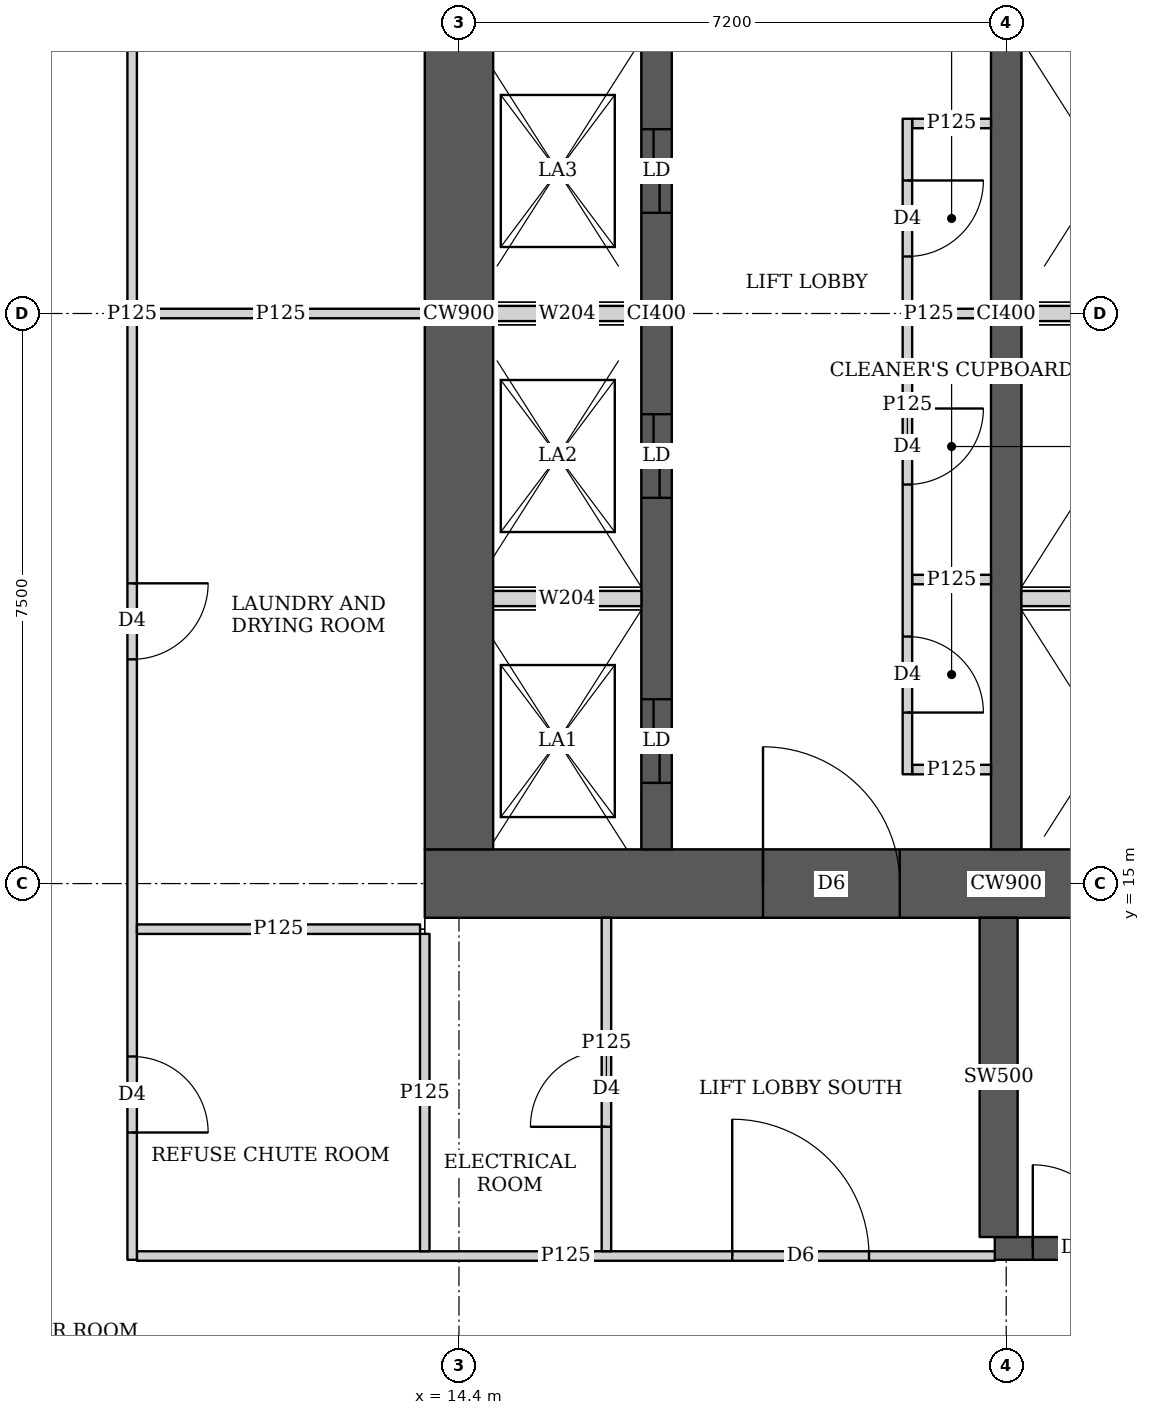
"""IFC4 building model, lengths in metres.
Left out: names, types, materials, properties, quantities, classifications, styles, units other than length and angle.
Written with IfcOpenShell. Run it as: python <this file> out.ifc"""

import sys

from ifc_helpers import new_model, si_unit, direction, frame, frame_2d, origin, place, context, subcontext, project, spatial, rectangle, extrude, element, fill, save


model = new_model("IFC4")
c1 = context("Model", 3, precision=1e-05, world=origin(), true_north=direction((0.0, 1.0)))
c2 = subcontext(c1, "Body", "Model", "MODEL_VIEW")
j1 = project(units=[si_unit("LENGTHUNIT", "METRE"), si_unit("PLANEANGLEUNIT", "RADIAN")], contexts=[c1])
p1 = place(None, origin())
s1 = spatial("IfcSite", under=j1, at=p1, CompositionType="ELEMENT")
p2 = place(p1, origin())
s2 = spatial("IfcBuilding", under=s1, at=p2, CompositionType="ELEMENT")
p3 = place(p2, frame((0.0, 0.0, 122.9)))
s3 = spatial("IfcBuildingStorey", under=s2, at=p3, CompositionType="ELEMENT", Elevation=122.9)
p4 = place(p3, frame((13.95, 15.0, 0.0), z_axis=(0.0, 0.0, 1.0), x_axis=(1.0, 0.0, 0.0)))
e1 = element("IfcWall", 1, at=p4, inside=s3, PredefinedType="SHEAR", context=c2, shape_type="SweptSolid", body=[
    extrude(rectangle(XDim=15.3, YDim=0.9, at=frame_2d((7.65, 0.0))), origin(), (0.0, 0.0, 1.0), 3.75),
])
p5 = place(p4, frame((4.45, 0.0, 0.0)))
e2 = element("IfcOpeningElement", 2, at=p5, cuts=e1, PredefinedType="OPENING", context=c2, shape_type="SweptSolid", body=[
    extrude(rectangle(XDim=1.8, YDim=2.1, at=frame_2d((0.9, 1.05))), frame((0.0, 0.46, 0.0), z_axis=(0.0, -1.0, 0.0), x_axis=(1.0, 0.0, 0.0)), (0.0, 0.0, 1.0), 0.92),
])
p6 = place(p4, frame((10.7, 0.0, 0.0)))
e3 = element("IfcOpeningElement", 3, at=p6, cuts=e1, PredefinedType="OPENING", context=c2, shape_type="SweptSolid", body=[
    extrude(rectangle(XDim=1.1, YDim=2.1, at=frame_2d((0.55, 1.05))), frame((0.0, 0.46, 0.0), z_axis=(0.0, -1.0, 0.0), x_axis=(1.0, 0.0, 0.0)), (0.0, 0.0, 1.0), 0.92),
])
p7 = place(p3, frame((14.4, 15.45, 0.0), z_axis=(0.0, 0.0, 1.0), x_axis=(0.0, 1.0, 0.0)))
e4 = element("IfcWall", 4, at=p7, inside=s3, PredefinedType="SHEAR", context=c2, shape_type="SweptSolid", body=[
    extrude(rectangle(XDim=14.1, YDim=0.9, at=frame_2d((7.05, 0.0))), origin(), (0.0, 0.0, 1.0), 3.75),
])
p8 = place(p3, frame((17.0, 15.45, 0.0), z_axis=(0.0, 0.0, 1.0), x_axis=(0.0, 1.0, 0.0)))
e5 = element("IfcWall", 5, at=p8, inside=s3, PredefinedType="SHEAR", context=c2, shape_type="SweptSolid", body=[
    extrude(rectangle(XDim=14.1, YDim=0.4, at=frame_2d((7.05, 0.0))), origin(), (0.0, 0.0, 1.0), 3.75),
])
p9 = place(p8, frame((0.875, 0.0, 0.0)))
e6 = element("IfcOpeningElement", 6, at=p9, cuts=e5, PredefinedType="OPENING", context=c2, shape_type="SweptSolid", body=[
    extrude(rectangle(XDim=1.1, YDim=2.1, at=frame_2d((0.55, 1.05))), frame((0.0, 0.21, 0.0), z_axis=(0.0, -1.0, 0.0), x_axis=(1.0, 0.0, 0.0)), (0.0, 0.0, 1.0), 0.42),
])
p10 = place(p8, frame((4.625, 0.0, 0.0)))
e7 = element("IfcOpeningElement", 7, at=p10, cuts=e5, PredefinedType="OPENING", context=c2, shape_type="SweptSolid", body=[
    extrude(rectangle(XDim=1.1, YDim=2.1, at=frame_2d((0.55, 1.05))), frame((0.0, 0.21, 0.0), z_axis=(0.0, -1.0, 0.0), x_axis=(1.0, 0.0, 0.0)), (0.0, 0.0, 1.0), 0.42),
])
p11 = place(p8, frame((8.375, 0.0, 0.0)))
e8 = element("IfcOpeningElement", 8, at=p11, cuts=e5, PredefinedType="OPENING", context=c2, shape_type="SweptSolid", body=[
    extrude(rectangle(XDim=1.1, YDim=2.1, at=frame_2d((0.55, 1.05))), frame((0.0, 0.21, 0.0), z_axis=(0.0, -1.0, 0.0), x_axis=(1.0, 0.0, 0.0)), (0.0, 0.0, 1.0), 0.42),
])
p12 = place(p8, frame((12.125, 0.0, 0.0)))
e9 = element("IfcOpeningElement", 9, at=p12, cuts=e5, PredefinedType="OPENING", context=c2, shape_type="SweptSolid", body=[
    extrude(rectangle(XDim=1.1, YDim=2.1, at=frame_2d((0.55, 1.05))), frame((0.0, 0.21, 0.0), z_axis=(0.0, -1.0, 0.0), x_axis=(1.0, 0.0, 0.0)), (0.0, 0.0, 1.0), 0.42),
])
p13 = place(p3, frame((21.6, 15.45, 0.0), z_axis=(0.0, 0.0, 1.0), x_axis=(0.0, 1.0, 0.0)))
e10 = element("IfcWall", 10, at=p13, inside=s3, PredefinedType="SHEAR", context=c2, shape_type="SweptSolid", body=[
    extrude(rectangle(XDim=14.1, YDim=0.4, at=frame_2d((7.05, 0.0))), origin(), (0.0, 0.0, 1.0), 3.75),
])
p14 = place(p3, frame((21.45, 10.2, 0.0), z_axis=(0.0, 0.0, 1.0), x_axis=(1.0, 0.0, 0.0)))
e11 = element("IfcWall", 11, at=p14, inside=s3, PredefinedType="SHEAR", context=c2, shape_type="SweptSolid", body=[
    extrude(rectangle(XDim=7.5, YDim=0.3, at=frame_2d((3.75, 0.0))), origin(), (0.0, 0.0, 1.0), 3.75),
])
p15 = place(p14, frame((0.5, 0.0, 0.0)))
e12 = element("IfcOpeningElement", 12, at=p15, cuts=e11, PredefinedType="OPENING", context=c2, shape_type="SweptSolid", body=[
    extrude(rectangle(XDim=1.1, YDim=2.1, at=frame_2d((0.55, 1.05))), frame((0.0, 0.16, 0.0), z_axis=(0.0, -1.0, 0.0), x_axis=(1.0, 0.0, 0.0)), (0.0, 0.0, 1.0), 0.32),
])
p16 = place(p3, frame((21.5, 10.35, 0.0), z_axis=(0.0, 0.0, 1.0), x_axis=(0.0, 1.0, 0.0)))
e13 = element("IfcWall", 13, at=p16, inside=s3, PredefinedType="SHEAR", context=c2, shape_type="SweptSolid", body=[
    extrude(rectangle(XDim=4.2, YDim=0.5, at=frame_2d((2.1, 0.0))), origin(), (0.0, 0.0, 1.0), 3.75),
])
p17 = place(p3, frame((10.1, 10.05, 0.0), z_axis=(0.0, 0.0, 1.0), x_axis=(0.0, 1.0, 0.0)))
e14 = element("IfcWall", 14, at=p17, inside=s3, PredefinedType="PARTITIONING", context=c2, shape_type="SweptSolid", body=[
    extrude(rectangle(XDim=24.9, YDim=0.125, at=frame_2d((12.45, 0.0))), origin(), (0.0, 0.0, 1.0), 3.5),
])
p18 = place(p17, frame((1.675, 0.0, 0.0)))
e15 = element("IfcOpeningElement", 15, at=p18, cuts=e14, PredefinedType="OPENING", context=c2, shape_type="SweptSolid", body=[
    extrude(rectangle(XDim=1.0, YDim=2.1, at=frame_2d((0.5, 1.05))), frame((0.0, 0.073, 0.0), z_axis=(0.0, -1.0, 0.0), x_axis=(1.0, 0.0, 0.0)), (0.0, 0.0, 1.0), 0.145),
])
p19 = place(p17, frame((7.9, 0.0, 0.0)))
e16 = element("IfcOpeningElement", 16, at=p19, cuts=e14, PredefinedType="OPENING", context=c2, shape_type="SweptSolid", body=[
    extrude(rectangle(XDim=1.0, YDim=2.1, at=frame_2d((0.5, 1.05))), frame((0.0, 0.073, 0.0), z_axis=(0.0, -1.0, 0.0), x_axis=(1.0, 0.0, 0.0)), (0.0, 0.0, 1.0), 0.145),
])
p20 = place(p17, frame((16.0, 0.0, 0.0)))
e17 = element("IfcOpeningElement", 17, at=p20, cuts=e14, PredefinedType="OPENING", context=c2, shape_type="SweptSolid", body=[
    extrude(rectangle(XDim=1.0, YDim=2.1, at=frame_2d((0.5, 1.05))), frame((0.0, 0.073, 0.0), z_axis=(0.0, -1.0, 0.0), x_axis=(1.0, 0.0, 0.0)), (0.0, 0.0, 1.0), 0.145),
])
p21 = place(p17, frame((22.225, 0.0, 0.0)))
e18 = element("IfcOpeningElement", 18, at=p21, cuts=e14, PredefinedType="OPENING", context=c2, shape_type="SweptSolid", body=[
    extrude(rectangle(XDim=1.0, YDim=2.1, at=frame_2d((0.5, 1.05))), frame((0.0, 0.073, 0.0), z_axis=(0.0, -1.0, 0.0), x_axis=(1.0, 0.0, 0.0)), (0.0, 0.0, 1.0), 0.145),
])
p22 = place(p3, frame((10.163, 14.4, 0.0), z_axis=(0.0, 0.0, 1.0), x_axis=(1.0, 0.0, 0.0)))
e19 = element("IfcWall", 19, at=p22, inside=s3, PredefinedType="PARTITIONING", context=c2, shape_type="SweptSolid", body=[
    extrude(rectangle(XDim=3.725, YDim=0.125, at=frame_2d((1.862, 0.0))), origin(), (0.0, 0.0, 1.0), 3.5),
])
p23 = place(p3, frame((10.163, 22.5, 0.0), z_axis=(0.0, 0.0, 1.0), x_axis=(1.0, 0.0, 0.0)))
e20 = element("IfcWall", 20, at=p23, inside=s3, PredefinedType="PARTITIONING", context=c2, shape_type="SweptSolid", body=[
    extrude(rectangle(XDim=3.787, YDim=0.125, at=frame_2d((1.894, 0.0))), origin(), (0.0, 0.0, 1.0), 3.5),
])
p24 = place(p3, frame((13.95, 10.163, 0.0), z_axis=(0.0, 0.0, 1.0), x_axis=(0.0, 1.0, 0.0)))
e21 = element("IfcWall", 21, at=p24, inside=s3, PredefinedType="PARTITIONING", context=c2, shape_type="SweptSolid", body=[
    extrude(rectangle(XDim=4.175, YDim=0.125, at=frame_2d((2.087, 0.0))), origin(), (0.0, 0.0, 1.0), 3.5),
])
p25 = place(p3, frame((10.163, 10.1, 0.0), z_axis=(0.0, 0.0, 1.0), x_axis=(1.0, 0.0, 0.0)))
e22 = element("IfcWall", 22, at=p25, inside=s3, PredefinedType="PARTITIONING", context=c2, shape_type="SweptSolid", body=[
    extrude(rectangle(XDim=11.287, YDim=0.125, at=frame_2d((5.644, 0.0))), origin(), (0.0, 0.0, 1.0), 3.5),
])
p26 = place(p25, frame((7.832, 0.0, 0.0)))
e23 = element("IfcOpeningElement", 23, at=p26, cuts=e22, PredefinedType="OPENING", context=c2, shape_type="SweptSolid", body=[
    extrude(rectangle(XDim=1.8, YDim=2.1, at=frame_2d((0.9, 1.05))), frame((0.0, 0.073, 0.0), z_axis=(0.0, -1.0, 0.0), x_axis=(1.0, 0.0, 0.0)), (0.0, 0.0, 1.0), 0.145),
])
p27 = place(p3, frame((16.34, 10.163, 0.0), z_axis=(0.0, 0.0, 1.0), x_axis=(0.0, 1.0, 0.0)))
e24 = element("IfcWall", 24, at=p27, inside=s3, PredefinedType="PARTITIONING", context=c2, shape_type="SweptSolid", body=[
    extrude(rectangle(XDim=4.387, YDim=0.125, at=frame_2d((2.193, 0.0))), origin(), (0.0, 0.0, 1.0), 3.5),
])
p28 = place(p27, frame((1.637, 0.0, 0.0)))
e25 = element("IfcOpeningElement", 25, at=p28, cuts=e24, PredefinedType="OPENING", context=c2, shape_type="SweptSolid", body=[
    extrude(rectangle(XDim=1.0, YDim=2.1, at=frame_2d((0.5, 1.05))), frame((0.0, 0.073, 0.0), z_axis=(0.0, -1.0, 0.0), x_axis=(1.0, 0.0, 0.0)), (0.0, 0.0, 1.0), 0.145),
])
p29 = place(p3, frame((20.3, 16.438, 0.0), z_axis=(0.0, 0.0, 1.0), x_axis=(0.0, 1.0, 0.0)))
e26 = element("IfcWall", 26, at=p29, inside=s3, PredefinedType="PARTITIONING", context=c2, shape_type="SweptSolid", body=[
    extrude(rectangle(XDim=8.624, YDim=0.125, at=frame_2d((4.312, 0.0))), origin(), (0.0, 0.0, 1.0), 3.5),
])
p30 = place(p29, frame((0.812, 0.0, 0.0)))
e27 = element("IfcOpeningElement", 27, at=p30, cuts=e26, PredefinedType="OPENING", context=c2, shape_type="SweptSolid", body=[
    extrude(rectangle(XDim=1.0, YDim=2.1, at=frame_2d((0.5, 1.05))), frame((0.0, 0.073, 0.0), z_axis=(0.0, -1.0, 0.0), x_axis=(1.0, 0.0, 0.0)), (0.0, 0.0, 1.0), 0.145),
])
p31 = place(p29, frame((3.812, 0.0, 0.0)))
e28 = element("IfcOpeningElement", 28, at=p31, cuts=e26, PredefinedType="OPENING", context=c2, shape_type="SweptSolid", body=[
    extrude(rectangle(XDim=1.0, YDim=2.1, at=frame_2d((0.5, 1.05))), frame((0.0, 0.073, 0.0), z_axis=(0.0, -1.0, 0.0), x_axis=(1.0, 0.0, 0.0)), (0.0, 0.0, 1.0), 0.145),
])
p32 = place(p29, frame((6.812, 0.0, 0.0)))
e29 = element("IfcOpeningElement", 29, at=p32, cuts=e26, PredefinedType="OPENING", context=c2, shape_type="SweptSolid", body=[
    extrude(rectangle(XDim=1.0, YDim=2.1, at=frame_2d((0.5, 1.05))), frame((0.0, 0.073, 0.0), z_axis=(0.0, -1.0, 0.0), x_axis=(1.0, 0.0, 0.0)), (0.0, 0.0, 1.0), 0.145),
])
for number, where, z_axis, x_axis in (
    (30, (20.363, 16.5, 0.0), (0.0, 0.0, 1.0), (1.0, 0.0, 0.0)),
    (31, (20.363, 25.0, 0.0), (0.0, 0.0, 1.0), (1.0, 0.0, 0.0)),
    (32, (20.363, 19.0, 0.0), (0.0, 0.0, 1.0), (1.0, 0.0, 0.0)),
    (33, (20.363, 22.5, 0.0), (0.0, 0.0, 1.0), (1.0, 0.0, 0.0)),
):
    element("IfcWall", number, at=place(p3, frame(where, z_axis=z_axis, x_axis=x_axis)), inside=s3, PredefinedType="PARTITIONING", context=c2, shape_type="SweptSolid", body=[
        extrude(rectangle(XDim=1.037, YDim=0.125, at=frame_2d((0.519, 0.0))), origin(), (0.0, 0.0, 1.0), 3.5),
    ])
p33 = place(p3, frame((14.85, 18.75, 0.0), z_axis=(0.0, 0.0, 1.0), x_axis=(1.0, 0.0, 0.0)))
e34 = element("IfcWall", 34, at=p33, inside=s3, PredefinedType="SOLIDWALL", context=c2, shape_type="SweptSolid", body=[
    extrude(rectangle(XDim=1.95, YDim=0.2, at=frame_2d((0.975, 0.0))), origin(), (0.0, 0.0, 1.0), 3.5),
])
p34 = place(p3, frame((21.8, 18.75, 0.0), z_axis=(0.0, 0.0, 1.0), x_axis=(1.0, 0.0, 0.0)))
e35 = element("IfcWall", 35, at=p34, inside=s3, PredefinedType="SOLIDWALL", context=c2, shape_type="SweptSolid", body=[
    extrude(rectangle(XDim=2.2, YDim=0.2, at=frame_2d((1.1, 0.0))), origin(), (0.0, 0.0, 1.0), 3.5),
])
p35 = place(p3, frame((14.85, 22.5, 0.0), z_axis=(0.0, 0.0, 1.0), x_axis=(1.0, 0.0, 0.0)))
e36 = element("IfcWall", 36, at=p35, inside=s3, PredefinedType="SOLIDWALL", context=c2, shape_type="SweptSolid", body=[
    extrude(rectangle(XDim=1.95, YDim=0.2, at=frame_2d((0.975, 0.0))), origin(), (0.0, 0.0, 1.0), 3.5),
])
p36 = place(p3, frame((21.8, 22.5, 0.0), z_axis=(0.0, 0.0, 1.0), x_axis=(1.0, 0.0, 0.0)))
e37 = element("IfcWall", 37, at=p36, inside=s3, PredefinedType="SOLIDWALL", context=c2, shape_type="SweptSolid", body=[
    extrude(rectangle(XDim=2.2, YDim=0.2, at=frame_2d((1.1, 0.0))), origin(), (0.0, 0.0, 1.0), 3.5),
])
p37 = place(p18, origin())
e38 = element("IfcDoor", 38, at=p37, inside=s3, OperationType="SINGLE_SWING_RIGHT", PredefinedType="DOOR", context=c2, shape_type="SweptSolid", body=[
    extrude(rectangle(XDim=1.0, YDim=2.1, at=frame_2d((0.5, 1.05))), frame((0.0, 0.025, 0.0), z_axis=(0.0, -1.0, 0.0), x_axis=(1.0, 0.0, 0.0)), (0.0, 0.0, 1.0), 0.05),
])
fill(e15, e38)
p38 = place(p19, origin())
e39 = element("IfcDoor", 39, at=p38, inside=s3, OperationType="SINGLE_SWING_LEFT", PredefinedType="DOOR", context=c2, shape_type="SweptSolid", body=[
    extrude(rectangle(XDim=1.0, YDim=2.1, at=frame_2d((0.5, 1.05))), frame((0.0, 0.025, 0.0), z_axis=(0.0, -1.0, 0.0), x_axis=(1.0, 0.0, 0.0)), (0.0, 0.0, 1.0), 0.05),
])
fill(e16, e39)
p39 = place(p28, origin())
e40 = element("IfcDoor", 40, at=p39, inside=s3, OperationType="SINGLE_SWING_LEFT", PredefinedType="DOOR", context=c2, shape_type="SweptSolid", body=[
    extrude(rectangle(XDim=1.0, YDim=2.1, at=frame_2d((0.5, 1.05))), frame((0.0, 0.025, 0.0), z_axis=(0.0, -1.0, 0.0), x_axis=(1.0, 0.0, 0.0)), (0.0, 0.0, 1.0), 0.05),
])
fill(e25, e40)
p40 = place(p26, origin())
e41 = element("IfcDoor", 41, at=p40, inside=s3, OperationType="DOUBLE_DOOR_SINGLE_SWING", PredefinedType="DOOR", context=c2, shape_type="SweptSolid", body=[
    extrude(rectangle(XDim=1.8, YDim=2.1, at=frame_2d((0.9, 1.05))), frame((0.0, 0.025, 0.0), z_axis=(0.0, -1.0, 0.0), x_axis=(1.0, 0.0, 0.0)), (0.0, 0.0, 1.0), 0.05),
])
fill(e23, e41)
p41 = place(p30, origin())
e42 = element("IfcDoor", 42, at=p41, inside=s3, OperationType="SINGLE_SWING_RIGHT", PredefinedType="DOOR", context=c2, shape_type="SweptSolid", body=[
    extrude(rectangle(XDim=1.0, YDim=2.1, at=frame_2d((0.5, 1.05))), frame((0.0, 0.025, 0.0), z_axis=(0.0, -1.0, 0.0), x_axis=(1.0, 0.0, 0.0)), (0.0, 0.0, 1.0), 0.05),
])
fill(e27, e42)
p42 = place(p31, origin())
e43 = element("IfcDoor", 43, at=p42, inside=s3, OperationType="SINGLE_SWING_LEFT", PredefinedType="DOOR", context=c2, shape_type="SweptSolid", body=[
    extrude(rectangle(XDim=1.0, YDim=2.1, at=frame_2d((0.5, 1.05))), frame((0.0, 0.025, 0.0), z_axis=(0.0, -1.0, 0.0), x_axis=(1.0, 0.0, 0.0)), (0.0, 0.0, 1.0), 0.05),
])
fill(e28, e43)
p43 = place(p32, origin())
e44 = element("IfcDoor", 44, at=p43, inside=s3, OperationType="SINGLE_SWING_LEFT", PredefinedType="DOOR", context=c2, shape_type="SweptSolid", body=[
    extrude(rectangle(XDim=1.0, YDim=2.1, at=frame_2d((0.5, 1.05))), frame((0.0, 0.025, 0.0), z_axis=(0.0, -1.0, 0.0), x_axis=(1.0, 0.0, 0.0)), (0.0, 0.0, 1.0), 0.05),
])
fill(e29, e44)
p44 = place(p5, origin())
e45 = element("IfcDoor", 45, at=p44, inside=s3, OperationType="DOUBLE_DOOR_SINGLE_SWING", PredefinedType="DOOR", context=c2, shape_type="SweptSolid", body=[
    extrude(rectangle(XDim=1.8, YDim=2.1, at=frame_2d((0.9, 1.05))), frame((0.0, 0.025, 0.0), z_axis=(0.0, -1.0, 0.0), x_axis=(1.0, 0.0, 0.0)), (0.0, 0.0, 1.0), 0.05),
])
fill(e2, e45)
p45 = place(p9, origin())
e46 = element("IfcDoor", 46, at=p45, inside=s3, OperationType="DOUBLE_DOOR_SLIDING", PredefinedType="DOOR", context=c2, shape_type="SweptSolid", body=[
    extrude(rectangle(XDim=1.1, YDim=2.1, at=frame_2d((0.55, 1.05))), frame((0.0, 0.025, 0.0), z_axis=(0.0, -1.0, 0.0), x_axis=(1.0, 0.0, 0.0)), (0.0, 0.0, 1.0), 0.05),
])
fill(e6, e46)
p46 = place(p10, origin())
e47 = element("IfcDoor", 47, at=p46, inside=s3, OperationType="DOUBLE_DOOR_SLIDING", PredefinedType="DOOR", context=c2, shape_type="SweptSolid", body=[
    extrude(rectangle(XDim=1.1, YDim=2.1, at=frame_2d((0.55, 1.05))), frame((0.0, 0.025, 0.0), z_axis=(0.0, -1.0, 0.0), x_axis=(1.0, 0.0, 0.0)), (0.0, 0.0, 1.0), 0.05),
])
fill(e7, e47)
p47 = place(p11, origin())
e48 = element("IfcDoor", 48, at=p47, inside=s3, OperationType="DOUBLE_DOOR_SLIDING", PredefinedType="DOOR", context=c2, shape_type="SweptSolid", body=[
    extrude(rectangle(XDim=1.1, YDim=2.1, at=frame_2d((0.55, 1.05))), frame((0.0, 0.025, 0.0), z_axis=(0.0, -1.0, 0.0), x_axis=(1.0, 0.0, 0.0)), (0.0, 0.0, 1.0), 0.05),
])
fill(e8, e48)
p48 = place(p15, origin())
e49 = element("IfcDoor", 49, at=p48, inside=s3, OperationType="SINGLE_SWING_LEFT", PredefinedType="DOOR", context=c2, shape_type="SweptSolid", body=[
    extrude(rectangle(XDim=1.1, YDim=2.1, at=frame_2d((0.55, 1.05))), frame((0.0, 0.025, 0.0), z_axis=(0.0, -1.0, 0.0), x_axis=(1.0, 0.0, 0.0)), (0.0, 0.0, 1.0), 0.05),
])
fill(e12, e49)
save(model, sys.argv[1])
